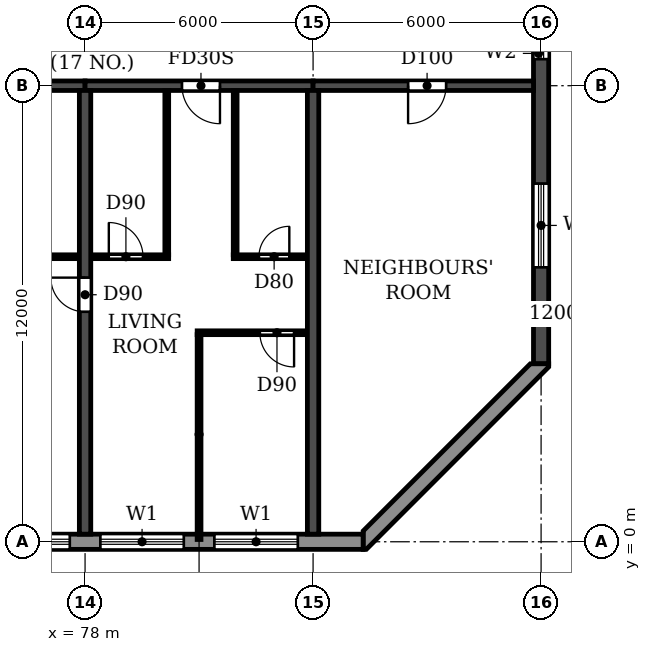
"""IFC4 building model, lengths in metres.
Left out: names, types, materials, properties, quantities, classifications, styles, units other than length and angle.
Written with IfcOpenShell. Run it as: python <this file> out.ifc"""

import sys

from ifc_helpers import new_model, si_unit, direction, frame, frame_2d, origin, place, context, subcontext, project, spatial, polyline, rectangle, outline, extrude, element, fill, save


model = new_model("IFC4")
c1 = context("Model", 3, precision=1e-05, world=origin(), true_north=direction((0.0, 1.0)))
c2 = subcontext(c1, "Body", "Model", "MODEL_VIEW")
j1 = project(units=[si_unit("LENGTHUNIT", "METRE"), si_unit("PLANEANGLEUNIT", "RADIAN")], contexts=[c1])
p1 = place(None, origin())
s1 = spatial("IfcSite", under=j1, at=p1, CompositionType="ELEMENT")
p2 = place(p1, origin())
s2 = spatial("IfcBuilding", under=s1, at=p2, CompositionType="ELEMENT")
p3 = place(p2, frame((0.0, 0.0, 142.2)))
s3 = spatial("IfcBuildingStorey", under=s2, at=p3, CompositionType="ELEMENT", Elevation=142.2)
p4 = place(p3, frame((78.0, 0.2, 0.0), z_axis=(0.0, 0.0, 1.0), x_axis=(0.0, 1.0, 0.0)))
e1 = element("IfcWall", 1, at=p4, inside=s3, PredefinedType="SHEAR", context=c2, shape_type="SweptSolid", body=[
    extrude(rectangle(XDim=11.675, YDim=0.3, at=frame_2d((5.837, 0.0))), origin(), (0.0, 0.0, 1.0), 3.07),
])
p5 = place(p4, frame((5.85, 0.0, 0.0)))
e2 = element("IfcOpeningElement", 2, at=p5, cuts=e1, PredefinedType="OPENING", context=c2, shape_type="SweptSolid", body=[
    extrude(rectangle(XDim=0.9, YDim=2.1, at=frame_2d((0.45, 1.05))), frame((0.0, 0.16, 0.0), z_axis=(0.0, -1.0, 0.0), x_axis=(1.0, 0.0, 0.0)), (0.0, 0.0, 1.0), 0.32),
])
p6 = place(p3, frame((84.0, 0.2, 0.0), z_axis=(0.0, 0.0, 1.0), x_axis=(0.0, 1.0, 0.0)))
e3 = element("IfcWall", 3, at=p6, inside=s3, PredefinedType="SHEAR", context=c2, shape_type="SweptSolid", body=[
    extrude(rectangle(XDim=11.675, YDim=0.3, at=frame_2d((5.837, 0.0))), origin(), (0.0, 0.0, 1.0), 3.07),
])
p7 = place(p3, frame((90.0, 4.683, 0.0), z_axis=(0.0, 0.0, 1.0), x_axis=(0.0, 1.0, 0.0)))
e4 = element("IfcWall", 4, at=p7, inside=s3, PredefinedType="SHEAR", context=c2, shape_type="SweptSolid", body=[
    extrude(rectangle(XDim=33.034, YDim=0.4, at=frame_2d((16.517, 0.0))), origin(), (0.0, 0.0, 1.0), 3.07),
])
p8 = place(p7, frame((23.817, 0.0, 0.9)))
e5 = element("IfcOpeningElement", 5, at=p8, cuts=e4, PredefinedType="OPENING", context=c2, shape_type="SweptSolid", body=[
    extrude(rectangle(XDim=1.2, YDim=1.5, at=frame_2d((0.6, 0.75))), frame((0.0, 0.21, 0.0), z_axis=(0.0, -1.0, 0.0), x_axis=(1.0, 0.0, 0.0)), (0.0, 0.0, 1.0), 0.42),
])
p9 = place(p7, frame((8.017, 0.0, 0.9)))
e6 = element("IfcOpeningElement", 6, at=p9, cuts=e4, PredefinedType="OPENING", context=c2, shape_type="SweptSolid", body=[
    extrude(rectangle(XDim=1.2, YDim=1.5, at=frame_2d((0.6, 0.75))), frame((0.0, 0.21, 0.0), z_axis=(0.0, -1.0, 0.0), x_axis=(1.0, 0.0, 0.0)), (0.0, 0.0, 1.0), 0.42),
])
p10 = place(p7, frame((28.293, 0.0, 0.6)))
e7 = element("IfcOpeningElement", 7, at=p10, cuts=e4, PredefinedType="OPENING", context=c2, shape_type="SweptSolid", body=[
    extrude(rectangle(XDim=2.2, YDim=1.8, at=frame_2d((1.1, 0.9))), frame((0.0, 0.21, 0.0), z_axis=(0.0, -1.0, 0.0), x_axis=(1.0, 0.0, 0.0)), (0.0, 0.0, 1.0), 0.42),
])
p11 = place(p7, frame((2.541, 0.0, 0.6)))
e8 = element("IfcOpeningElement", 8, at=p11, cuts=e4, PredefinedType="OPENING", context=c2, shape_type="SweptSolid", body=[
    extrude(rectangle(XDim=2.2, YDim=1.8, at=frame_2d((1.1, 0.9))), frame((0.0, 0.21, 0.0), z_axis=(0.0, -1.0, 0.0), x_axis=(1.0, 0.0, 0.0)), (0.0, 0.0, 1.0), 0.42),
])
p12 = place(p7, frame((12.817, 0.0, 0.6)))
e9 = element("IfcOpeningElement", 9, at=p12, cuts=e4, PredefinedType="OPENING", context=c2, shape_type="SweptSolid", body=[
    extrude(rectangle(XDim=2.2, YDim=1.8, at=frame_2d((1.1, 0.9))), frame((0.0, 0.21, 0.0), z_axis=(0.0, -1.0, 0.0), x_axis=(1.0, 0.0, 0.0)), (0.0, 0.0, 1.0), 0.42),
])
p13 = place(p3, frame((72.0, 12.0, 0.0), z_axis=(0.0, 0.0, 1.0), x_axis=(1.0, 0.0, 0.0)))
e10 = element("IfcWall", 10, at=p13, inside=s3, PredefinedType="SHEAR", context=c2, shape_type="SweptSolid", body=[
    extrude(rectangle(XDim=6.0, YDim=0.25, at=frame_2d((3.0, 0.0))), origin(), (0.0, 0.0, 1.0), 2.47),
])
p14 = place(p3, frame((78.0, 12.0, 0.0), z_axis=(0.0, 0.0, 1.0), x_axis=(1.0, 0.0, 0.0)))
e11 = element("IfcWall", 11, at=p14, inside=s3, PredefinedType="SHEAR", context=c2, shape_type="SweptSolid", body=[
    extrude(rectangle(XDim=6.0, YDim=0.25, at=frame_2d((3.0, 0.0))), origin(), (0.0, 0.0, 1.0), 2.47),
])
p15 = place(p14, frame((2.55, 0.0, 0.0)))
e12 = element("IfcOpeningElement", 12, at=p15, cuts=e11, PredefinedType="OPENING", context=c2, shape_type="SweptSolid", body=[
    extrude(rectangle(XDim=1.0, YDim=2.1, at=frame_2d((0.5, 1.05))), frame((0.0, 0.135, 0.0), z_axis=(0.0, -1.0, 0.0), x_axis=(1.0, 0.0, 0.0)), (0.0, 0.0, 1.0), 0.27),
])
p16 = place(p3, frame((84.0, 12.0, 0.0), z_axis=(0.0, 0.0, 1.0), x_axis=(1.0, 0.0, 0.0)))
e13 = element("IfcWall", 13, at=p16, inside=s3, PredefinedType="SHEAR", context=c2, shape_type="SweptSolid", body=[
    extrude(rectangle(XDim=5.8, YDim=0.25, at=frame_2d((2.9, 0.0))), origin(), (0.0, 0.0, 1.0), 2.47),
])
p17 = place(p16, frame((2.5, 0.0, 0.0)))
e14 = element("IfcOpeningElement", 14, at=p17, cuts=e13, PredefinedType="OPENING", context=c2, shape_type="SweptSolid", body=[
    extrude(rectangle(XDim=1.0, YDim=2.1, at=frame_2d((0.5, 1.05))), frame((0.0, 0.135, 0.0), z_axis=(0.0, -1.0, 0.0), x_axis=(1.0, 0.0, 0.0)), (0.0, 0.0, 1.0), 0.27),
])
p18 = place(p3, frame((16.683, 0.0, 0.0), z_axis=(0.0, 0.0, 1.0), x_axis=(1.0, 0.0, 0.0)))
e15 = element("IfcWall", 15, at=p18, inside=s3, PredefinedType="STANDARD", context=c2, shape_type="SweptSolid", body=[
    extrude(rectangle(XDim=68.634, YDim=0.4, at=frame_2d((34.317, 0.0))), origin(), (0.0, 0.0, 1.0), 3.07),
])
p19 = place(p18, frame((1.717, 0.0, 0.9)))
e16 = element("IfcOpeningElement", 16, at=p19, cuts=e15, PredefinedType="OPENING", context=c2, shape_type="SweptSolid", body=[
    extrude(rectangle(XDim=2.2, YDim=1.5, at=frame_2d((1.1, 0.75))), frame((0.0, 0.21, 0.0), z_axis=(0.0, -1.0, 0.0), x_axis=(1.0, 0.0, 0.0)), (0.0, 0.0, 1.0), 0.42),
])
p20 = place(p18, frame((4.717, 0.0, 0.9)))
e17 = element("IfcOpeningElement", 17, at=p20, cuts=e15, PredefinedType="OPENING", context=c2, shape_type="SweptSolid", body=[
    extrude(rectangle(XDim=2.2, YDim=1.5, at=frame_2d((1.1, 0.75))), frame((0.0, 0.21, 0.0), z_axis=(0.0, -1.0, 0.0), x_axis=(1.0, 0.0, 0.0)), (0.0, 0.0, 1.0), 0.42),
])
p21 = place(p18, frame((7.717, 0.0, 0.9)))
e18 = element("IfcOpeningElement", 18, at=p21, cuts=e15, PredefinedType="OPENING", context=c2, shape_type="SweptSolid", body=[
    extrude(rectangle(XDim=2.2, YDim=1.5, at=frame_2d((1.1, 0.75))), frame((0.0, 0.21, 0.0), z_axis=(0.0, -1.0, 0.0), x_axis=(1.0, 0.0, 0.0)), (0.0, 0.0, 1.0), 0.42),
])
p22 = place(p18, frame((10.717, 0.0, 0.9)))
e19 = element("IfcOpeningElement", 19, at=p22, cuts=e15, PredefinedType="OPENING", context=c2, shape_type="SweptSolid", body=[
    extrude(rectangle(XDim=2.2, YDim=1.5, at=frame_2d((1.1, 0.75))), frame((0.0, 0.21, 0.0), z_axis=(0.0, -1.0, 0.0), x_axis=(1.0, 0.0, 0.0)), (0.0, 0.0, 1.0), 0.42),
])
p23 = place(p18, frame((13.717, 0.0, 0.9)))
e20 = element("IfcOpeningElement", 20, at=p23, cuts=e15, PredefinedType="OPENING", context=c2, shape_type="SweptSolid", body=[
    extrude(rectangle(XDim=2.2, YDim=1.5, at=frame_2d((1.1, 0.75))), frame((0.0, 0.21, 0.0), z_axis=(0.0, -1.0, 0.0), x_axis=(1.0, 0.0, 0.0)), (0.0, 0.0, 1.0), 0.42),
])
p24 = place(p18, frame((16.717, 0.0, 0.9)))
e21 = element("IfcOpeningElement", 21, at=p24, cuts=e15, PredefinedType="OPENING", context=c2, shape_type="SweptSolid", body=[
    extrude(rectangle(XDim=2.2, YDim=1.5, at=frame_2d((1.1, 0.75))), frame((0.0, 0.21, 0.0), z_axis=(0.0, -1.0, 0.0), x_axis=(1.0, 0.0, 0.0)), (0.0, 0.0, 1.0), 0.42),
])
p25 = place(p18, frame((19.717, 0.0, 0.9)))
e22 = element("IfcOpeningElement", 22, at=p25, cuts=e15, PredefinedType="OPENING", context=c2, shape_type="SweptSolid", body=[
    extrude(rectangle(XDim=2.2, YDim=1.5, at=frame_2d((1.1, 0.75))), frame((0.0, 0.21, 0.0), z_axis=(0.0, -1.0, 0.0), x_axis=(1.0, 0.0, 0.0)), (0.0, 0.0, 1.0), 0.42),
])
p26 = place(p18, frame((22.717, 0.0, 0.9)))
e23 = element("IfcOpeningElement", 23, at=p26, cuts=e15, PredefinedType="OPENING", context=c2, shape_type="SweptSolid", body=[
    extrude(rectangle(XDim=2.2, YDim=1.5, at=frame_2d((1.1, 0.75))), frame((0.0, 0.21, 0.0), z_axis=(0.0, -1.0, 0.0), x_axis=(1.0, 0.0, 0.0)), (0.0, 0.0, 1.0), 0.42),
])
p27 = place(p18, frame((25.717, 0.0, 0.9)))
e24 = element("IfcOpeningElement", 24, at=p27, cuts=e15, PredefinedType="OPENING", context=c2, shape_type="SweptSolid", body=[
    extrude(rectangle(XDim=2.2, YDim=1.5, at=frame_2d((1.1, 0.75))), frame((0.0, 0.21, 0.0), z_axis=(0.0, -1.0, 0.0), x_axis=(1.0, 0.0, 0.0)), (0.0, 0.0, 1.0), 0.42),
])
p28 = place(p18, frame((28.717, 0.0, 0.9)))
e25 = element("IfcOpeningElement", 25, at=p28, cuts=e15, PredefinedType="OPENING", context=c2, shape_type="SweptSolid", body=[
    extrude(rectangle(XDim=2.2, YDim=1.5, at=frame_2d((1.1, 0.75))), frame((0.0, 0.21, 0.0), z_axis=(0.0, -1.0, 0.0), x_axis=(1.0, 0.0, 0.0)), (0.0, 0.0, 1.0), 0.42),
])
p29 = place(p18, frame((31.717, 0.0, 0.9)))
e26 = element("IfcOpeningElement", 26, at=p29, cuts=e15, PredefinedType="OPENING", context=c2, shape_type="SweptSolid", body=[
    extrude(rectangle(XDim=2.2, YDim=1.5, at=frame_2d((1.1, 0.75))), frame((0.0, 0.21, 0.0), z_axis=(0.0, -1.0, 0.0), x_axis=(1.0, 0.0, 0.0)), (0.0, 0.0, 1.0), 0.42),
])
p30 = place(p18, frame((34.917, 0.0, 0.0)))
e27 = element("IfcOpeningElement", 27, at=p30, cuts=e15, PredefinedType="OPENING", context=c2, shape_type="SweptSolid", body=[
    extrude(rectangle(XDim=1.8, YDim=2.4, at=frame_2d((0.9, 1.2))), frame((0.0, 0.21, 0.0), z_axis=(0.0, -1.0, 0.0), x_axis=(1.0, 0.0, 0.0)), (0.0, 0.0, 1.0), 0.42),
])
p31 = place(p18, frame((37.717, 0.0, 0.9)))
e28 = element("IfcOpeningElement", 28, at=p31, cuts=e15, PredefinedType="OPENING", context=c2, shape_type="SweptSolid", body=[
    extrude(rectangle(XDim=2.2, YDim=1.5, at=frame_2d((1.1, 0.75))), frame((0.0, 0.21, 0.0), z_axis=(0.0, -1.0, 0.0), x_axis=(1.0, 0.0, 0.0)), (0.0, 0.0, 1.0), 0.42),
])
p32 = place(p18, frame((40.717, 0.0, 0.9)))
e29 = element("IfcOpeningElement", 29, at=p32, cuts=e15, PredefinedType="OPENING", context=c2, shape_type="SweptSolid", body=[
    extrude(rectangle(XDim=2.2, YDim=1.5, at=frame_2d((1.1, 0.75))), frame((0.0, 0.21, 0.0), z_axis=(0.0, -1.0, 0.0), x_axis=(1.0, 0.0, 0.0)), (0.0, 0.0, 1.0), 0.42),
])
p33 = place(p18, frame((43.717, 0.0, 0.9)))
e30 = element("IfcOpeningElement", 30, at=p33, cuts=e15, PredefinedType="OPENING", context=c2, shape_type="SweptSolid", body=[
    extrude(rectangle(XDim=2.2, YDim=1.5, at=frame_2d((1.1, 0.75))), frame((0.0, 0.21, 0.0), z_axis=(0.0, -1.0, 0.0), x_axis=(1.0, 0.0, 0.0)), (0.0, 0.0, 1.0), 0.42),
])
p34 = place(p18, frame((46.917, 0.0, 0.0)))
e31 = element("IfcOpeningElement", 31, at=p34, cuts=e15, PredefinedType="OPENING", context=c2, shape_type="SweptSolid", body=[
    extrude(rectangle(XDim=1.8, YDim=2.4, at=frame_2d((0.9, 1.2))), frame((0.0, 0.21, 0.0), z_axis=(0.0, -1.0, 0.0), x_axis=(1.0, 0.0, 0.0)), (0.0, 0.0, 1.0), 0.42),
])
p35 = place(p18, frame((49.717, 0.0, 0.9)))
e32 = element("IfcOpeningElement", 32, at=p35, cuts=e15, PredefinedType="OPENING", context=c2, shape_type="SweptSolid", body=[
    extrude(rectangle(XDim=2.2, YDim=1.5, at=frame_2d((1.1, 0.75))), frame((0.0, 0.21, 0.0), z_axis=(0.0, -1.0, 0.0), x_axis=(1.0, 0.0, 0.0)), (0.0, 0.0, 1.0), 0.42),
])
p36 = place(p18, frame((52.717, 0.0, 0.9)))
e33 = element("IfcOpeningElement", 33, at=p36, cuts=e15, PredefinedType="OPENING", context=c2, shape_type="SweptSolid", body=[
    extrude(rectangle(XDim=2.2, YDim=1.5, at=frame_2d((1.1, 0.75))), frame((0.0, 0.21, 0.0), z_axis=(0.0, -1.0, 0.0), x_axis=(1.0, 0.0, 0.0)), (0.0, 0.0, 1.0), 0.42),
])
p37 = place(p18, frame((55.717, 0.0, 0.9)))
e34 = element("IfcOpeningElement", 34, at=p37, cuts=e15, PredefinedType="OPENING", context=c2, shape_type="SweptSolid", body=[
    extrude(rectangle(XDim=2.2, YDim=1.5, at=frame_2d((1.1, 0.75))), frame((0.0, 0.21, 0.0), z_axis=(0.0, -1.0, 0.0), x_axis=(1.0, 0.0, 0.0)), (0.0, 0.0, 1.0), 0.42),
])
p38 = place(p18, frame((58.717, 0.0, 0.9)))
e35 = element("IfcOpeningElement", 35, at=p38, cuts=e15, PredefinedType="OPENING", context=c2, shape_type="SweptSolid", body=[
    extrude(rectangle(XDim=2.2, YDim=1.5, at=frame_2d((1.1, 0.75))), frame((0.0, 0.21, 0.0), z_axis=(0.0, -1.0, 0.0), x_axis=(1.0, 0.0, 0.0)), (0.0, 0.0, 1.0), 0.42),
])
p39 = place(p18, frame((61.717, 0.0, 0.9)))
e36 = element("IfcOpeningElement", 36, at=p39, cuts=e15, PredefinedType="OPENING", context=c2, shape_type="SweptSolid", body=[
    extrude(rectangle(XDim=2.2, YDim=1.5, at=frame_2d((1.1, 0.75))), frame((0.0, 0.21, 0.0), z_axis=(0.0, -1.0, 0.0), x_axis=(1.0, 0.0, 0.0)), (0.0, 0.0, 1.0), 0.42),
])
p40 = place(p18, frame((64.717, 0.0, 0.9)))
e37 = element("IfcOpeningElement", 37, at=p40, cuts=e15, PredefinedType="OPENING", context=c2, shape_type="SweptSolid", body=[
    extrude(rectangle(XDim=2.2, YDim=1.5, at=frame_2d((1.1, 0.75))), frame((0.0, 0.21, 0.0), z_axis=(0.0, -1.0, 0.0), x_axis=(1.0, 0.0, 0.0)), (0.0, 0.0, 1.0), 0.42),
])
p41 = place(p3, origin())
e38 = element("IfcWall", 38, at=p41, inside=s3, PredefinedType="STANDARD", context=c2, shape_type="SweptSolid", body=[
    extrude(outline(polyline([(85.317, -0.2), (85.4, -0.2), (90.2, 4.6), (90.2, 4.683), (89.717, 4.683), (85.317, 0.283), (85.317, -0.2)])), origin(), (0.0, 0.0, 1.0), 3.07),
])
p42 = place(p3, frame((80.95, 5.5, 0.0), z_axis=(0.0, 0.0, 1.0), x_axis=(1.0, 0.0, 0.0)))
e39 = element("IfcWall", 39, at=p42, inside=s3, PredefinedType="PARTITIONING", context=c2, shape_type="SweptSolid", body=[
    extrude(rectangle(XDim=2.89, YDim=0.1, at=frame_2d((1.445, 0.0))), origin(), (0.0, 0.0, 1.0), 3.07),
])
p43 = place(p42, frame((1.65, 0.0, 0.0)))
e40 = element("IfcOpeningElement", 40, at=p43, cuts=e39, PredefinedType="OPENING", context=c2, shape_type="SweptSolid", body=[
    extrude(rectangle(XDim=0.9, YDim=2.1, at=frame_2d((0.45, 1.05))), frame((0.0, 0.06, 0.0), z_axis=(0.0, -1.0, 0.0), x_axis=(1.0, 0.0, 0.0)), (0.0, 0.0, 1.0), 0.12),
])
p44 = place(p3, frame((75.1, 7.5, 0.0), z_axis=(0.0, 0.0, 1.0), x_axis=(1.0, 0.0, 0.0)))
e41 = element("IfcWall", 41, at=p44, inside=s3, PredefinedType="PARTITIONING", context=c2, shape_type="SweptSolid", body=[
    extrude(rectangle(XDim=2.74, YDim=0.1, at=frame_2d((1.37, 0.0))), origin(), (0.0, 0.0, 1.0), 3.07),
])
p45 = place(p44, frame((1.0, 0.0, 0.0)))
e42 = element("IfcOpeningElement", 42, at=p45, cuts=e41, PredefinedType="OPENING", context=c2, shape_type="SweptSolid", body=[
    extrude(rectangle(XDim=0.8, YDim=2.1, at=frame_2d((0.4, 1.05))), frame((0.0, 0.06, 0.0), z_axis=(0.0, -1.0, 0.0), x_axis=(1.0, 0.0, 0.0)), (0.0, 0.0, 1.0), 0.12),
])
p46 = place(p3, frame((78.16, 7.5, 0.0), z_axis=(0.0, 0.0, 1.0), x_axis=(1.0, 0.0, 0.0)))
e43 = element("IfcWall", 43, at=p46, inside=s3, PredefinedType="PARTITIONING", context=c2, shape_type="SweptSolid", body=[
    extrude(rectangle(XDim=2.04, YDim=0.1, at=frame_2d((1.02, 0.0))), origin(), (0.0, 0.0, 1.0), 3.07),
])
p47 = place(p46, frame((0.465, 0.0, 0.0)))
e44 = element("IfcOpeningElement", 44, at=p47, cuts=e43, PredefinedType="OPENING", context=c2, shape_type="SweptSolid", body=[
    extrude(rectangle(XDim=0.9, YDim=2.1, at=frame_2d((0.45, 1.05))), frame((0.0, 0.06, 0.0), z_axis=(0.0, -1.0, 0.0), x_axis=(1.0, 0.0, 0.0)), (0.0, 0.0, 1.0), 0.12),
])
p48 = place(p3, frame((81.9, 7.5, 0.0), z_axis=(0.0, 0.0, 1.0), x_axis=(1.0, 0.0, 0.0)))
e45 = element("IfcWall", 45, at=p48, inside=s3, PredefinedType="PARTITIONING", context=c2, shape_type="SweptSolid", body=[
    extrude(rectangle(XDim=1.94, YDim=0.1, at=frame_2d((0.97, 0.0))), origin(), (0.0, 0.0, 1.0), 3.07),
])
p49 = place(p48, frame((0.675, 0.0, 0.0)))
e46 = element("IfcOpeningElement", 46, at=p49, cuts=e45, PredefinedType="OPENING", context=c2, shape_type="SweptSolid", body=[
    extrude(rectangle(XDim=0.8, YDim=2.1, at=frame_2d((0.4, 1.05))), frame((0.0, 0.06, 0.0), z_axis=(0.0, -1.0, 0.0), x_axis=(1.0, 0.0, 0.0)), (0.0, 0.0, 1.0), 0.12),
])
p50 = place(p3, frame((80.15, 7.55, 0.0), z_axis=(0.0, 0.0, 1.0), x_axis=(0.0, 1.0, 0.0)))
e47 = element("IfcWall", 47, at=p50, inside=s3, PredefinedType="PARTITIONING", context=c2, shape_type="SweptSolid", body=[
    extrude(rectangle(XDim=4.315, YDim=0.1, at=frame_2d((2.157, 0.0))), origin(), (0.0, 0.0, 1.0), 3.07),
])
p51 = place(p3, frame((81.0, 0.06, 0.0), z_axis=(0.0, 0.0, 1.0), x_axis=(0.0, 1.0, 0.0)))
e48 = element("IfcWall", 48, at=p51, inside=s3, PredefinedType="PARTITIONING", context=c2, shape_type="SweptSolid", body=[
    extrude(rectangle(XDim=5.39, YDim=0.1, at=frame_2d((2.695, 0.0))), origin(), (0.0, 0.0, 1.0), 3.07),
])
p52 = place(p3, frame((81.95, 7.55, 0.0), z_axis=(0.0, 0.0, 1.0), x_axis=(0.0, 1.0, 0.0)))
e49 = element("IfcWall", 49, at=p52, inside=s3, PredefinedType="PARTITIONING", context=c2, shape_type="SweptSolid", body=[
    extrude(rectangle(XDim=4.315, YDim=0.1, at=frame_2d((2.157, 0.0))), origin(), (0.0, 0.0, 1.0), 3.07),
])
p53 = place(p38, origin())
e50 = element("IfcWindow", 50, at=p53, inside=s3, PartitioningType="DOUBLE_PANEL_HORIZONTAL", PredefinedType="WINDOW", context=c2, shape_type="SweptSolid", body=[
    extrude(rectangle(XDim=2.2, YDim=1.5, at=frame_2d((1.1, 0.75))), frame((0.0, 0.03, 0.0), z_axis=(0.0, -1.0, 0.0), x_axis=(1.0, 0.0, 0.0)), (0.0, 0.0, 1.0), 0.06),
])
fill(e35, e50)
p54 = place(p39, origin())
e51 = element("IfcWindow", 51, at=p54, inside=s3, PartitioningType="DOUBLE_PANEL_HORIZONTAL", PredefinedType="WINDOW", context=c2, shape_type="SweptSolid", body=[
    extrude(rectangle(XDim=2.2, YDim=1.5, at=frame_2d((1.1, 0.75))), frame((0.0, 0.03, 0.0), z_axis=(0.0, -1.0, 0.0), x_axis=(1.0, 0.0, 0.0)), (0.0, 0.0, 1.0), 0.06),
])
fill(e36, e51)
p55 = place(p40, origin())
e52 = element("IfcWindow", 52, at=p55, inside=s3, PartitioningType="DOUBLE_PANEL_HORIZONTAL", PredefinedType="WINDOW", context=c2, shape_type="SweptSolid", body=[
    extrude(rectangle(XDim=2.2, YDim=1.5, at=frame_2d((1.1, 0.75))), frame((0.0, 0.03, 0.0), z_axis=(0.0, -1.0, 0.0), x_axis=(1.0, 0.0, 0.0)), (0.0, 0.0, 1.0), 0.06),
])
fill(e37, e52)
p56 = place(p9, origin())
e53 = element("IfcWindow", 53, at=p56, inside=s3, PartitioningType="SINGLE_PANEL", PredefinedType="WINDOW", context=c2, shape_type="SweptSolid", body=[
    extrude(rectangle(XDim=1.2, YDim=1.5, at=frame_2d((0.6, 0.75))), frame((0.0, 0.03, 0.0), z_axis=(0.0, -1.0, 0.0), x_axis=(1.0, 0.0, 0.0)), (0.0, 0.0, 1.0), 0.06),
])
fill(e6, e53)
p57 = place(p11, origin())
e54 = element("IfcWindow", 54, at=p57, inside=s3, PartitioningType="DOUBLE_PANEL_HORIZONTAL", PredefinedType="WINDOW", context=c2, shape_type="SweptSolid", body=[
    extrude(rectangle(XDim=2.2, YDim=1.8, at=frame_2d((1.1, 0.9))), frame((0.0, 0.03, 0.0), z_axis=(0.0, -1.0, 0.0), x_axis=(1.0, 0.0, 0.0)), (0.0, 0.0, 1.0), 0.06),
])
fill(e8, e54)
p58 = place(p5, origin())
e55 = element("IfcDoor", 55, at=p58, inside=s3, OperationType="SINGLE_SWING_RIGHT", PredefinedType="DOOR", context=c2, shape_type="SweptSolid", body=[
    extrude(rectangle(XDim=0.9, YDim=2.1, at=frame_2d((0.45, 1.05))), frame((0.0, 0.025, 0.0), z_axis=(0.0, -1.0, 0.0), x_axis=(1.0, 0.0, 0.0)), (0.0, 0.0, 1.0), 0.05),
])
fill(e2, e55)
p59 = place(p47, origin())
e56 = element("IfcDoor", 56, at=p59, inside=s3, OperationType="SINGLE_SWING_LEFT", PredefinedType="DOOR", context=c2, shape_type="SweptSolid", body=[
    extrude(rectangle(XDim=0.9, YDim=2.1, at=frame_2d((0.45, 1.05))), frame((0.0, 0.025, 0.0), z_axis=(0.0, -1.0, 0.0), x_axis=(1.0, 0.0, 0.0)), (0.0, 0.0, 1.0), 0.05),
])
fill(e44, e56)
p60 = place(p15, frame((1.0, 0.0, 0.0), z_axis=(0.0, 0.0, 1.0), x_axis=(-1.0, 0.0, 0.0)))
e57 = element("IfcDoor", 57, at=p60, inside=s3, OperationType="SINGLE_SWING_LEFT", PredefinedType="DOOR", context=c2, shape_type="SweptSolid", body=[
    extrude(rectangle(XDim=1.0, YDim=2.1, at=frame_2d((0.5, 1.05))), frame((0.0, 0.025, 0.0), z_axis=(0.0, -1.0, 0.0), x_axis=(1.0, 0.0, 0.0)), (0.0, 0.0, 1.0), 0.05),
])
fill(e12, e57)
p61 = place(p49, origin())
e58 = element("IfcDoor", 58, at=p61, inside=s3, OperationType="SINGLE_SWING_RIGHT", PredefinedType="DOOR", context=c2, shape_type="SweptSolid", body=[
    extrude(rectangle(XDim=0.8, YDim=2.1, at=frame_2d((0.4, 1.05))), frame((0.0, 0.025, 0.0), z_axis=(0.0, -1.0, 0.0), x_axis=(1.0, 0.0, 0.0)), (0.0, 0.0, 1.0), 0.05),
])
fill(e46, e58)
p62 = place(p43, frame((0.9, 0.0, 0.0), z_axis=(0.0, 0.0, 1.0), x_axis=(-1.0, 0.0, 0.0)))
e59 = element("IfcDoor", 59, at=p62, inside=s3, OperationType="SINGLE_SWING_LEFT", PredefinedType="DOOR", context=c2, shape_type="SweptSolid", body=[
    extrude(rectangle(XDim=0.9, YDim=2.1, at=frame_2d((0.45, 1.05))), frame((0.0, 0.025, 0.0), z_axis=(0.0, -1.0, 0.0), x_axis=(1.0, 0.0, 0.0)), (0.0, 0.0, 1.0), 0.05),
])
fill(e40, e59)
p63 = place(p17, frame((1.0, 0.0, 0.0), z_axis=(0.0, 0.0, 1.0), x_axis=(-1.0, 0.0, 0.0)))
e60 = element("IfcDoor", 60, at=p63, inside=s3, OperationType="SINGLE_SWING_RIGHT", PredefinedType="DOOR", context=c2, shape_type="SweptSolid", body=[
    extrude(rectangle(XDim=1.0, YDim=2.1, at=frame_2d((0.5, 1.05))), frame((0.0, 0.025, 0.0), z_axis=(0.0, -1.0, 0.0), x_axis=(1.0, 0.0, 0.0)), (0.0, 0.0, 1.0), 0.05),
])
fill(e14, e60)
save(model, sys.argv[1])
